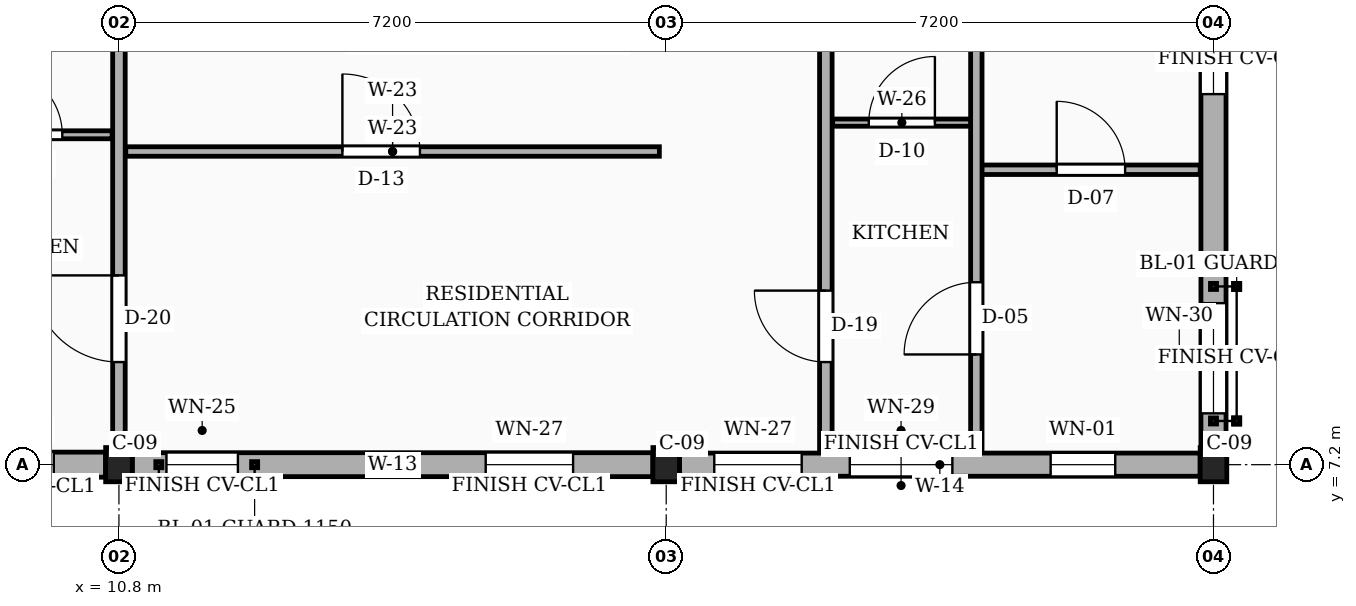
"""IFC4 building model, lengths in metres.
Left out: names, types, materials, properties, quantities, classifications, styles, units other than length and angle.
Written with IfcOpenShell. Run it as: python <this file> out.ifc"""

import sys

from ifc_helpers import new_model, si_unit, direction, frame, frame_2d, origin, origin_2d, place, context, subcontext, project, spatial, rectangle, extrude, element, fill, save


model = new_model("IFC4")
c1 = context("Model", 3, precision=1e-05, world=origin(), true_north=direction((0.0, 1.0)))
c2 = subcontext(c1, "Body", "Model", "MODEL_VIEW")
j1 = project(units=[si_unit("LENGTHUNIT", "METRE"), si_unit("PLANEANGLEUNIT", "RADIAN")], contexts=[c1])
p1 = place(None, origin())
s1 = spatial("IfcSite", under=j1, at=p1, CompositionType="ELEMENT")
p2 = place(p1, origin())
s2 = spatial("IfcBuilding", under=s1, at=p2, CompositionType="ELEMENT")
p3 = place(p2, frame((0.0, 0.0, 45.45)))
s3 = spatial("IfcBuildingStorey", under=s2, at=p3, CompositionType="ELEMENT", Elevation=45.45)
for number, where, z_axis, x_axis in (
    (1, (10.8, 7.2, 0.0), (0.0, 0.0, 1.0), (1.0, 0.0, 0.0)),
    (2, (18.0, 7.2, 0.0), (0.0, 0.0, 1.0), (1.0, 0.0, 0.0)),
    (3, (25.2, 7.2, 0.0), (0.0, 0.0, 1.0), (1.0, 0.0, 0.0)),
):
    element("IfcColumn", number, at=place(p3, frame(where, z_axis=z_axis, x_axis=x_axis)), inside=s3, PredefinedType="COLUMN", context=c2, shape_type="SweptSolid", body=[
        extrude(rectangle(XDim=0.35, YDim=0.45, at=origin_2d()), origin(), (0.0, 0.0, 1.0), 3.15),
    ])
p4 = place(p3, frame((3.775, 7.2, 0.0), z_axis=(0.0, 0.0, 1.0), x_axis=(1.0, 0.0, 0.0)))
e4 = element("IfcWall", 4, at=p4, inside=s3, PredefinedType="SOLIDWALL", context=c2, shape_type="SweptSolid", body=[
    extrude(rectangle(XDim=6.85, YDim=0.33, at=frame_2d((3.425, 0.0))), origin(), (0.0, 0.0, 1.0), 2.44),
])
p5 = place(p4, frame((1.722, 0.0, 0.78)))
e5 = element("IfcOpeningElement", 5, at=p5, cuts=e4, PredefinedType="OPENING", context=c2, shape_type="SweptSolid", body=[
    extrude(rectangle(XDim=1.38, YDim=1.36, at=frame_2d((0.69, 0.68))), frame((0.0, 0.175, 0.0), z_axis=(0.0, -1.0, 0.0), x_axis=(1.0, 0.0, 0.0)), (0.0, 0.0, 1.0), 0.35),
])
p6 = place(p4, frame((5.228, 0.0, 0.78)))
e6 = element("IfcOpeningElement", 6, at=p6, cuts=e4, PredefinedType="OPENING", context=c2, shape_type="SweptSolid", body=[
    extrude(rectangle(XDim=0.94, YDim=1.44, at=frame_2d((0.47, 0.72))), frame((0.0, 0.175, 0.0), z_axis=(0.0, -1.0, 0.0), x_axis=(1.0, 0.0, 0.0)), (0.0, 0.0, 1.0), 0.35),
])
p7 = place(p3, frame((10.975, 7.2, 0.0), z_axis=(0.0, 0.0, 1.0), x_axis=(1.0, 0.0, 0.0)))
e7 = element("IfcWall", 7, at=p7, inside=s3, PredefinedType="SOLIDWALL", context=c2, shape_type="SweptSolid", body=[
    extrude(rectangle(XDim=6.85, YDim=0.315, at=frame_2d((3.425, 0.0))), origin(), (0.0, 0.0, 1.0), 2.44),
])
p8 = place(p7, frame((0.45, 0.0, 0.78)))
e8 = element("IfcOpeningElement", 8, at=p8, cuts=e7, PredefinedType="OPENING", context=c2, shape_type="SweptSolid", body=[
    extrude(rectangle(XDim=0.94, YDim=1.44, at=frame_2d((0.47, 0.72))), frame((0.0, 0.167, 0.0), z_axis=(0.0, -1.0, 0.0), x_axis=(1.0, 0.0, 0.0)), (0.0, 0.0, 1.0), 0.335),
])
p9 = place(p7, frame((4.65, 0.0, 0.78)))
e9 = element("IfcOpeningElement", 9, at=p9, cuts=e7, PredefinedType="OPENING", context=c2, shape_type="SweptSolid", body=[
    extrude(rectangle(XDim=1.15, YDim=1.44, at=frame_2d((0.575, 0.72))), frame((0.0, 0.167, 0.0), z_axis=(0.0, -1.0, 0.0), x_axis=(1.0, 0.0, 0.0)), (0.0, 0.0, 1.0), 0.335),
])
p10 = place(p3, frame((18.175, 7.2, 0.0), z_axis=(0.0, 0.0, 1.0), x_axis=(1.0, 0.0, 0.0)))
e10 = element("IfcWall", 10, at=p10, inside=s3, PredefinedType="SOLIDWALL", context=c2, shape_type="SweptSolid", body=[
    extrude(rectangle(XDim=6.85, YDim=0.305, at=frame_2d((3.425, 0.0))), origin(), (0.0, 0.0, 1.0), 2.44),
])
p11 = place(p10, frame((0.458, 0.0, 0.78)))
e11 = element("IfcOpeningElement", 11, at=p11, cuts=e10, PredefinedType="OPENING", context=c2, shape_type="SweptSolid", body=[
    extrude(rectangle(XDim=1.15, YDim=1.44, at=frame_2d((0.575, 0.72))), frame((0.0, 0.163, 0.0), z_axis=(0.0, -1.0, 0.0), x_axis=(1.0, 0.0, 0.0)), (0.0, 0.0, 1.0), 0.325),
])
p12 = place(p10, frame((2.24, 0.0, 0.78)))
e12 = element("IfcOpeningElement", 12, at=p12, cuts=e10, PredefinedType="OPENING", context=c2, shape_type="SweptSolid", body=[
    extrude(rectangle(XDim=1.35, YDim=1.44, at=frame_2d((0.675, 0.72))), frame((0.0, 0.163, 0.0), z_axis=(0.0, -1.0, 0.0), x_axis=(1.0, 0.0, 0.0)), (0.0, 0.0, 1.0), 0.325),
])
p13 = place(p10, frame((4.883, 0.0, 0.78)))
e13 = element("IfcOpeningElement", 13, at=p13, cuts=e10, PredefinedType="OPENING", context=c2, shape_type="SweptSolid", body=[
    extrude(rectangle(XDim=0.85, YDim=1.15, at=frame_2d((0.425, 0.575))), frame((0.0, 0.163, 0.0), z_axis=(0.0, -1.0, 0.0), x_axis=(1.0, 0.0, 0.0)), (0.0, 0.0, 1.0), 0.325),
])
p14 = place(p3, frame((25.2, 7.425, 0.0), z_axis=(0.0, 0.0, 1.0), x_axis=(0.0, 1.0, 0.0)))
e14 = element("IfcWall", 14, at=p14, inside=s3, PredefinedType="SOLIDWALL", context=c2, shape_type="SweptSolid", body=[
    extrude(rectangle(XDim=6.75, YDim=0.33, at=frame_2d((3.375, 0.0))), origin(), (0.0, 0.0, 1.0), 2.44),
])
p15 = place(p14, frame((0.45, 0.0, 0.78)))
e15 = element("IfcOpeningElement", 15, at=p15, cuts=e14, PredefinedType="OPENING", context=c2, shape_type="SweptSolid", body=[
    extrude(rectangle(XDim=1.45, YDim=1.44, at=frame_2d((0.725, 0.72))), frame((0.0, 0.175, 0.0), z_axis=(0.0, -1.0, 0.0), x_axis=(1.0, 0.0, 0.0)), (0.0, 0.0, 1.0), 0.35),
])
p16 = place(p14, frame((4.65, 0.0, 0.78)))
e16 = element("IfcOpeningElement", 16, at=p16, cuts=e14, PredefinedType="OPENING", context=c2, shape_type="SweptSolid", body=[
    extrude(rectangle(XDim=0.92, YDim=1.15, at=frame_2d((0.46, 0.575))), frame((0.0, 0.175, 0.0), z_axis=(0.0, -1.0, 0.0), x_axis=(1.0, 0.0, 0.0)), (0.0, 0.0, 1.0), 0.35),
])
p17 = place(p3, frame((20.1, 7.375, 0.0), z_axis=(0.0, 0.0, 1.0), x_axis=(0.0, 1.0, 0.0)))
e17 = element("IfcWall", 17, at=p17, inside=s3, PredefinedType="PARTITIONING", context=c2, shape_type="SweptSolid", body=[
    extrude(rectangle(XDim=7.005, YDim=0.165, at=frame_2d((3.502, 0.0))), origin(), (0.0, 0.0, 1.0), 2.305),
])
p18 = place(p17, frame((1.175, 0.0, 0.0)))
e18 = element("IfcOpeningElement", 18, at=p18, cuts=e17, PredefinedType="OPENING", context=c2, shape_type="SweptSolid", body=[
    extrude(rectangle(XDim=0.94, YDim=2.12, at=frame_2d((0.47, 1.06))), frame((0.0, 0.093, 0.0), z_axis=(0.0, -1.0, 0.0), x_axis=(1.0, 0.0, 0.0)), (0.0, 0.0, 1.0), 0.185),
])
p19 = place(p3, frame((10.8, 7.55, 0.0), z_axis=(0.0, 0.0, 1.0), x_axis=(0.0, 1.0, 0.0)))
e19 = element("IfcWall", 19, at=p19, inside=s3, PredefinedType="PARTITIONING", context=c2, shape_type="SweptSolid", body=[
    extrude(rectangle(XDim=6.5, YDim=0.165, at=frame_2d((3.25, 0.0))), origin(), (0.0, 0.0, 1.0), 2.305),
])
p20 = place(p19, frame((1.0, 0.0, 0.0)))
e20 = element("IfcOpeningElement", 20, at=p20, cuts=e19, PredefinedType="OPENING", context=c2, shape_type="SweptSolid", body=[
    extrude(rectangle(XDim=1.14, YDim=2.18, at=frame_2d((0.57, 1.09))), frame((0.0, 0.093, 0.0), z_axis=(0.0, -1.0, 0.0), x_axis=(1.0, 0.0, 0.0)), (0.0, 0.0, 1.0), 0.185),
])
p21 = place(p3, frame((10.89, 11.32, 0.0), z_axis=(0.0, 0.0, 1.0), x_axis=(1.0, 0.0, 0.0)))
e21 = element("IfcWall", 21, at=p21, inside=s3, PredefinedType="PARTITIONING", context=c2, shape_type="SweptSolid", body=[
    extrude(rectangle(XDim=7.02, YDim=0.125, at=frame_2d((3.51, 0.0))), origin(), (0.0, 0.0, 1.0), 2.305),
])
p22 = place(p21, frame((2.85, 0.0, 0.0)))
e22 = element("IfcOpeningElement", 22, at=p22, cuts=e21, PredefinedType="OPENING", context=c2, shape_type="SweptSolid", body=[
    extrude(rectangle(XDim=1.02, YDim=2.15, at=frame_2d((0.51, 1.075))), frame((0.0, 0.073, 0.0), z_axis=(0.0, -1.0, 0.0), x_axis=(1.0, 0.0, 0.0)), (0.0, 0.0, 1.0), 0.145),
])
p23 = place(p3, frame((8.53, 11.54, 0.0), z_axis=(0.0, 0.0, 1.0), x_axis=(1.0, 0.0, 0.0)))
e23 = element("IfcWall", 23, at=p23, inside=s3, PredefinedType="PARTITIONING", context=c2, shape_type="SweptSolid", body=[
    extrude(rectangle(XDim=2.18, YDim=0.105, at=frame_2d((1.09, 0.0))), origin(), (0.0, 0.0, 1.0), 2.305),
])
p24 = place(p23, frame((0.655, 0.0, 0.0)))
e24 = element("IfcOpeningElement", 24, at=p24, cuts=e23, PredefinedType="OPENING", context=c2, shape_type="SweptSolid", body=[
    extrude(rectangle(XDim=0.87, YDim=2.05, at=frame_2d((0.435, 1.025))), frame((0.0, 0.062, 0.0), z_axis=(0.0, -1.0, 0.0), x_axis=(1.0, 0.0, 0.0)), (0.0, 0.0, 1.0), 0.125),
])
p25 = place(p3, frame((22.15, 11.08, 0.0), z_axis=(0.0, 0.0, 1.0), x_axis=(1.0, 0.0, 0.0)))
e25 = element("IfcWall", 25, at=p25, inside=s3, PredefinedType="PARTITIONING", context=c2, shape_type="SweptSolid", body=[
    extrude(rectangle(XDim=2.875, YDim=0.125, at=frame_2d((1.438, 0.0))), origin(), (0.0, 0.0, 1.0), 2.305),
])
p26 = place(p25, frame((0.988, 0.0, 0.0)))
e26 = element("IfcOpeningElement", 26, at=p26, cuts=e25, PredefinedType="OPENING", context=c2, shape_type="SweptSolid", body=[
    extrude(rectangle(XDim=0.9, YDim=2.1, at=frame_2d((0.45, 1.05))), frame((0.0, 0.073, 0.0), z_axis=(0.0, -1.0, 0.0), x_axis=(1.0, 0.0, 0.0)), (0.0, 0.0, 1.0), 0.145),
])
p27 = place(p3, frame((20.19, 11.7, 0.0), z_axis=(0.0, 0.0, 1.0), x_axis=(1.0, 0.0, 0.0)))
e27 = element("IfcWall", 27, at=p27, inside=s3, PredefinedType="PARTITIONING", context=c2, shape_type="SweptSolid", body=[
    extrude(rectangle(XDim=1.82, YDim=0.095, at=frame_2d((0.91, 0.0))), origin(), (0.0, 0.0, 1.0), 2.305),
])
p28 = place(p27, frame((0.475, 0.0, 0.0)))
e28 = element("IfcOpeningElement", 28, at=p28, cuts=e27, PredefinedType="OPENING", context=c2, shape_type="SweptSolid", body=[
    extrude(rectangle(XDim=0.87, YDim=2.05, at=frame_2d((0.435, 1.025))), frame((0.0, 0.058, 0.0), z_axis=(0.0, -1.0, 0.0), x_axis=(1.0, 0.0, 0.0)), (0.0, 0.0, 1.0), 0.115),
])
p29 = place(p3, frame((22.08, 7.375, 0.0), z_axis=(0.0, 0.0, 1.0), x_axis=(0.0, 1.0, 0.0)))
e29 = element("IfcWall", 29, at=p29, inside=s3, PredefinedType="PARTITIONING", context=c2, shape_type="SweptSolid", body=[
    extrude(rectangle(XDim=6.885, YDim=0.15, at=frame_2d((3.442, 0.0))), origin(), (0.0, 0.0, 1.0), 2.305),
])
p30 = place(p29, frame((1.275, 0.0, 0.0)))
e30 = element("IfcOpeningElement", 30, at=p30, cuts=e29, PredefinedType="OPENING", context=c2, shape_type="SweptSolid", body=[
    extrude(rectangle(XDim=0.95, YDim=2.1, at=frame_2d((0.475, 1.05))), frame((0.0, 0.085, 0.0), z_axis=(0.0, -1.0, 0.0), x_axis=(1.0, 0.0, 0.0)), (0.0, 0.0, 1.0), 0.17),
])
p31 = place(p6, origin())
e31 = element("IfcWindow", 31, at=p31, inside=s3, PartitioningType="SINGLE_PANEL", PredefinedType="WINDOW", context=c2, shape_type="SweptSolid", body=[
    extrude(rectangle(XDim=0.94, YDim=1.44, at=frame_2d((0.47, 0.72))), frame((0.0, 0.03, 0.0), z_axis=(0.0, -1.0, 0.0), x_axis=(1.0, 0.0, 0.0)), (0.0, 0.0, 1.0), 0.06),
])
fill(e6, e31)
p32 = place(p8, origin())
e32 = element("IfcWindow", 32, at=p32, inside=s3, PartitioningType="SINGLE_PANEL", PredefinedType="WINDOW", context=c2, shape_type="SweptSolid", body=[
    extrude(rectangle(XDim=0.94, YDim=1.44, at=frame_2d((0.47, 0.72))), frame((0.0, 0.03, 0.0), z_axis=(0.0, -1.0, 0.0), x_axis=(1.0, 0.0, 0.0)), (0.0, 0.0, 1.0), 0.06),
])
fill(e8, e32)
p33 = place(p9, origin())
e33 = element("IfcWindow", 33, at=p33, inside=s3, PartitioningType="SINGLE_PANEL", PredefinedType="WINDOW", context=c2, shape_type="SweptSolid", body=[
    extrude(rectangle(XDim=1.15, YDim=1.44, at=frame_2d((0.575, 0.72))), frame((0.0, 0.03, 0.0), z_axis=(0.0, -1.0, 0.0), x_axis=(1.0, 0.0, 0.0)), (0.0, 0.0, 1.0), 0.06),
])
fill(e9, e33)
p34 = place(p11, origin())
e34 = element("IfcWindow", 34, at=p34, inside=s3, PartitioningType="SINGLE_PANEL", PredefinedType="WINDOW", context=c2, shape_type="SweptSolid", body=[
    extrude(rectangle(XDim=1.15, YDim=1.44, at=frame_2d((0.575, 0.72))), frame((0.0, 0.03, 0.0), z_axis=(0.0, -1.0, 0.0), x_axis=(1.0, 0.0, 0.0)), (0.0, 0.0, 1.0), 0.06),
])
fill(e11, e34)
p35 = place(p12, origin())
e35 = element("IfcWindow", 35, at=p35, inside=s3, PartitioningType="SINGLE_PANEL", PredefinedType="WINDOW", context=c2, shape_type="SweptSolid", body=[
    extrude(rectangle(XDim=1.35, YDim=1.44, at=frame_2d((0.675, 0.72))), frame((0.0, 0.03, 0.0), z_axis=(0.0, -1.0, 0.0), x_axis=(1.0, 0.0, 0.0)), (0.0, 0.0, 1.0), 0.06),
])
fill(e12, e35)
p36 = place(p13, origin())
e36 = element("IfcWindow", 36, at=p36, inside=s3, PartitioningType="SINGLE_PANEL", PredefinedType="WINDOW", context=c2, shape_type="SweptSolid", body=[
    extrude(rectangle(XDim=0.85, YDim=1.15, at=frame_2d((0.425, 0.575))), frame((0.0, 0.03, 0.0), z_axis=(0.0, -1.0, 0.0), x_axis=(1.0, 0.0, 0.0)), (0.0, 0.0, 1.0), 0.06),
])
fill(e13, e36)
p37 = place(p15, origin())
e37 = element("IfcWindow", 37, at=p37, inside=s3, PartitioningType="SINGLE_PANEL", PredefinedType="WINDOW", context=c2, shape_type="SweptSolid", body=[
    extrude(rectangle(XDim=1.45, YDim=1.44, at=frame_2d((0.725, 0.72))), frame((0.0, 0.03, 0.0), z_axis=(0.0, -1.0, 0.0), x_axis=(1.0, 0.0, 0.0)), (0.0, 0.0, 1.0), 0.06),
])
fill(e15, e37)
p38 = place(p16, origin())
e38 = element("IfcWindow", 38, at=p38, inside=s3, PartitioningType="SINGLE_PANEL", PredefinedType="WINDOW", context=c2, shape_type="SweptSolid", body=[
    extrude(rectangle(XDim=0.92, YDim=1.15, at=frame_2d((0.46, 0.575))), frame((0.0, 0.03, 0.0), z_axis=(0.0, -1.0, 0.0), x_axis=(1.0, 0.0, 0.0)), (0.0, 0.0, 1.0), 0.06),
])
fill(e16, e38)
p39 = place(p18, origin())
e39 = element("IfcDoor", 39, at=p39, inside=s3, OperationType="SINGLE_SWING_RIGHT", PredefinedType="DOOR", context=c2, shape_type="SweptSolid", body=[
    extrude(rectangle(XDim=0.94, YDim=2.12, at=frame_2d((0.47, 1.06))), frame((0.0, 0.025, 0.0), z_axis=(0.0, -1.0, 0.0), x_axis=(1.0, 0.0, 0.0)), (0.0, 0.0, 1.0), 0.05),
])
fill(e18, e39)
p40 = place(p20, origin())
e40 = element("IfcDoor", 40, at=p40, inside=s3, OperationType="SINGLE_SWING_RIGHT", PredefinedType="DOOR", context=c2, shape_type="SweptSolid", body=[
    extrude(rectangle(XDim=1.14, YDim=2.18, at=frame_2d((0.57, 1.09))), frame((0.0, 0.025, 0.0), z_axis=(0.0, -1.0, 0.0), x_axis=(1.0, 0.0, 0.0)), (0.0, 0.0, 1.0), 0.05),
])
fill(e20, e40)
p41 = place(p22, origin())
e41 = element("IfcDoor", 41, at=p41, inside=s3, OperationType="SINGLE_SWING_LEFT", PredefinedType="DOOR", context=c2, shape_type="SweptSolid", body=[
    extrude(rectangle(XDim=1.02, YDim=2.15, at=frame_2d((0.51, 1.075))), frame((0.0, 0.025, 0.0), z_axis=(0.0, -1.0, 0.0), x_axis=(1.0, 0.0, 0.0)), (0.0, 0.0, 1.0), 0.05),
])
fill(e22, e41)
p42 = place(p24, origin())
e42 = element("IfcDoor", 42, at=p42, inside=s3, OperationType="SINGLE_SWING_LEFT", PredefinedType="DOOR", context=c2, shape_type="SweptSolid", body=[
    extrude(rectangle(XDim=0.87, YDim=2.05, at=frame_2d((0.435, 1.025))), frame((0.0, 0.025, 0.0), z_axis=(0.0, -1.0, 0.0), x_axis=(1.0, 0.0, 0.0)), (0.0, 0.0, 1.0), 0.05),
])
fill(e24, e42)
p43 = place(p26, origin())
e43 = element("IfcDoor", 43, at=p43, inside=s3, OperationType="SINGLE_SWING_LEFT", PredefinedType="DOOR", context=c2, shape_type="SweptSolid", body=[
    extrude(rectangle(XDim=0.9, YDim=2.1, at=frame_2d((0.45, 1.05))), frame((0.0, 0.025, 0.0), z_axis=(0.0, -1.0, 0.0), x_axis=(1.0, 0.0, 0.0)), (0.0, 0.0, 1.0), 0.05),
])
fill(e26, e43)
p44 = place(p28, origin())
e44 = element("IfcDoor", 44, at=p44, inside=s3, OperationType="SINGLE_SWING_RIGHT", PredefinedType="DOOR", context=c2, shape_type="SweptSolid", body=[
    extrude(rectangle(XDim=0.87, YDim=2.05, at=frame_2d((0.435, 1.025))), frame((0.0, 0.025, 0.0), z_axis=(0.0, -1.0, 0.0), x_axis=(1.0, 0.0, 0.0)), (0.0, 0.0, 1.0), 0.05),
])
fill(e28, e44)
p45 = place(p30, origin())
e45 = element("IfcDoor", 45, at=p45, inside=s3, OperationType="SINGLE_SWING_LEFT", PredefinedType="DOOR", context=c2, shape_type="SweptSolid", body=[
    extrude(rectangle(XDim=0.95, YDim=2.1, at=frame_2d((0.475, 1.05))), frame((0.0, 0.025, 0.0), z_axis=(0.0, -1.0, 0.0), x_axis=(1.0, 0.0, 0.0)), (0.0, 0.0, 1.0), 0.05),
])
fill(e30, e45)
save(model, sys.argv[1])
